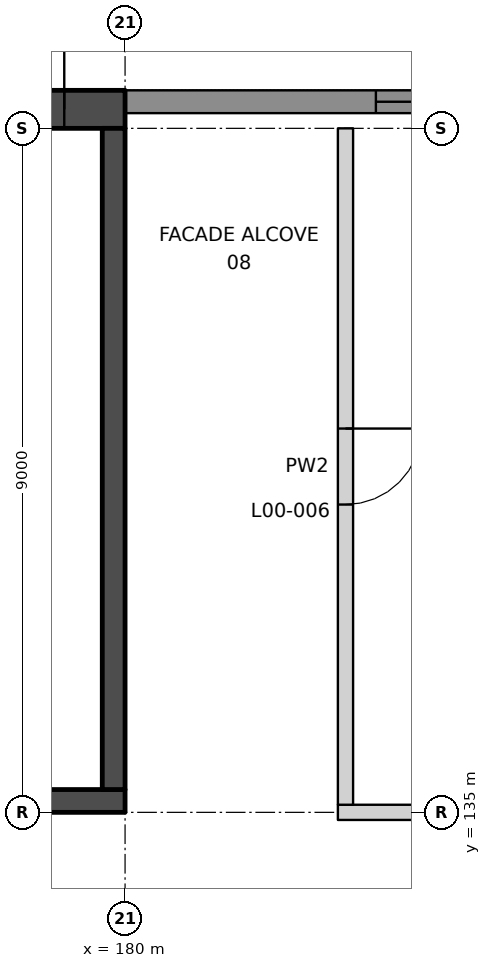
"""IFC4 building model, lengths in metres.
Left out: names, types, materials, properties, quantities, classifications, styles, units other than length and angle.
Written with IfcOpenShell. Run it as: python <this file> out.ifc"""

import sys

from ifc_helpers import new_model, si_unit, direction, frame, frame_2d, origin, place, context, subcontext, project, spatial, rectangle, extrude, element, fill, save


model = new_model("IFC4")
c1 = context("Model", 3, precision=1e-05, world=origin(), true_north=direction((0.0, 1.0)))
c2 = subcontext(c1, "Body", "Model", "MODEL_VIEW")
j1 = project(units=[si_unit("LENGTHUNIT", "METRE"), si_unit("PLANEANGLEUNIT", "RADIAN")], contexts=[c1])
p1 = place(None, origin())
s1 = spatial("IfcSite", under=j1, at=p1, CompositionType="ELEMENT")
p2 = place(p1, origin())
s2 = spatial("IfcBuilding", under=s1, at=p2, CompositionType="ELEMENT")
p3 = place(p2, origin())
s3 = spatial("IfcBuildingStorey", under=s2, at=p3, CompositionType="ELEMENT", Elevation=0.0)
p4 = place(p3, frame((182.8, 135.0, 0.0), z_axis=(0.0, 0.0, 1.0), x_axis=(1.0, 0.0, 0.0)))
e1 = element("IfcWall", 1, at=p4, inside=s3, PredefinedType="PARTITIONING", context=c2, shape_type="SweptSolid", body=[
    extrude(rectangle(XDim=6.2, YDim=0.2, at=frame_2d((3.1, 0.0))), origin(), (0.0, 0.0, 1.0), 5.65),
])
p5 = place(p3, frame((182.9, 135.1, 0.0), z_axis=(0.0, 0.0, 1.0), x_axis=(0.0, 1.0, 0.0)))
e2 = element("IfcWall", 2, at=p5, inside=s3, PredefinedType="PARTITIONING", context=c2, shape_type="SweptSolid", body=[
    extrude(rectangle(XDim=8.9, YDim=0.2, at=frame_2d((4.45, 0.0))), origin(), (0.0, 0.0, 1.0), 7.0),
])
p6 = place(p5, frame((3.95, 0.0, 0.0)))
e3 = element("IfcOpeningElement", 3, at=p6, cuts=e2, PredefinedType="OPENING", context=c2, shape_type="SweptSolid", body=[
    extrude(rectangle(XDim=1.0, YDim=2.1, at=frame_2d((0.5, 1.05))), frame((0.0, 0.11, 0.0), z_axis=(0.0, -1.0, 0.0), x_axis=(1.0, 0.0, 0.0)), (0.0, 0.0, 1.0), 0.22),
])
p7 = place(p3, frame((189.0, 144.35, 0.0), z_axis=(0.0, 0.0, 1.0), x_axis=(-1.0, 0.0, 0.0)))
e4 = element("IfcWall", 4, at=p7, inside=s3, PredefinedType="SOLIDWALL", context=c2, shape_type="SweptSolid", body=[
    extrude(rectangle(XDim=9.0, YDim=0.3, at=frame_2d((4.5, 0.0))), origin(), (0.0, 0.0, 1.0), 7.0),
])
p8 = place(p7, frame((3.3, 0.0, 0.0)))
e5 = element("IfcOpeningElement", 5, at=p8, cuts=e4, PredefinedType="OPENING", context=c2, shape_type="SweptSolid", body=[
    extrude(rectangle(XDim=2.4, YDim=2.4, at=frame_2d((1.2, 1.2))), frame((0.0, 0.16, 0.0), z_axis=(0.0, -1.0, 0.0), x_axis=(1.0, 0.0, 0.0)), (0.0, 0.0, 1.0), 0.32),
])
p9 = place(p3, frame((180.0, 135.15, 0.0), z_axis=(0.0, 0.0, 1.0), x_axis=(-1.0, 0.0, 0.0)))
e6 = element("IfcWall", 6, at=p9, inside=s3, PredefinedType="SHEAR", context=c2, shape_type="SweptSolid", body=[
    extrude(rectangle(XDim=18.0, YDim=0.3, at=frame_2d((9.0, 0.0))), origin(), (0.0, 0.0, 1.0), 7.0),
])
p10 = place(p9, frame((1.5, 0.0, 0.0)))
e7 = element("IfcOpeningElement", 7, at=p10, cuts=e6, PredefinedType="OPENING", context=c2, shape_type="SweptSolid", body=[
    extrude(rectangle(XDim=1.2, YDim=2.1, at=frame_2d((0.6, 1.05))), frame((0.0, 0.16, 0.0), z_axis=(0.0, -1.0, 0.0), x_axis=(1.0, 0.0, 0.0)), (0.0, 0.0, 1.0), 0.32),
])
p11 = place(p3, frame((180.0, 144.25, 0.0), z_axis=(0.0, 0.0, 1.0), x_axis=(-1.0, 0.0, 0.0)))
e8 = element("IfcWall", 8, at=p11, inside=s3, PredefinedType="SHEAR", context=c2, shape_type="SweptSolid", body=[
    extrude(rectangle(XDim=18.0, YDim=0.5, at=frame_2d((9.0, 0.0))), origin(), (0.0, 0.0, 1.0), 7.0),
])
p12 = place(p11, frame((0.8, 0.0, 0.0)))
e9 = element("IfcOpeningElement", 9, at=p12, cuts=e8, PredefinedType="OPENING", context=c2, shape_type="SweptSolid", body=[
    extrude(rectangle(XDim=2.6, YDim=2.4, at=frame_2d((1.3, 1.2))), frame((0.0, 0.26, 0.0), z_axis=(0.0, -1.0, 0.0), x_axis=(1.0, 0.0, 0.0)), (0.0, 0.0, 1.0), 0.52),
])
p13 = place(p3, frame((179.85, 135.3, 0.0), z_axis=(0.0, 0.0, 1.0), x_axis=(0.0, 1.0, 0.0)))
e10 = element("IfcWall", 10, at=p13, inside=s3, PredefinedType="SHEAR", context=c2, shape_type="SweptSolid", body=[
    extrude(rectangle(XDim=8.7, YDim=0.3, at=frame_2d((4.35, 0.0))), origin(), (0.0, 0.0, 1.0), 7.0),
])
p14 = place(p6, frame((1.0, 0.0, 0.0), z_axis=(0.0, 0.0, 1.0), x_axis=(-1.0, 0.0, 0.0)))
e11 = element("IfcDoor", 11, at=p14, inside=s3, OperationType="SINGLE_SWING_LEFT", PredefinedType="DOOR", context=c2, shape_type="SweptSolid", body=[
    extrude(rectangle(XDim=1.0, YDim=2.1, at=frame_2d((0.5, 1.05))), frame((0.0, 0.025, 0.0), z_axis=(0.0, -1.0, 0.0), x_axis=(1.0, 0.0, 0.0)), (0.0, 0.0, 1.0), 0.05),
])
fill(e3, e11)
p15 = place(p8, frame((2.4, 0.0, 0.0), z_axis=(0.0, 0.0, 1.0), x_axis=(-1.0, 0.0, 0.0)))
e12 = element("IfcDoor", 12, at=p15, inside=s3, OperationType="DOUBLE_DOOR_SINGLE_SWING", PredefinedType="DOOR", context=c2, shape_type="SweptSolid", body=[
    extrude(rectangle(XDim=2.4, YDim=2.4, at=frame_2d((1.2, 1.2))), frame((0.0, 0.025, 0.0), z_axis=(0.0, -1.0, 0.0), x_axis=(1.0, 0.0, 0.0)), (0.0, 0.0, 1.0), 0.05),
])
fill(e5, e12)
p16 = place(p12, frame((2.6, 0.0, 0.0), z_axis=(0.0, 0.0, 1.0), x_axis=(-1.0, 0.0, 0.0)))
e13 = element("IfcDoor", 13, at=p16, inside=s3, OperationType="DOUBLE_DOOR_SINGLE_SWING", PredefinedType="DOOR", context=c2, shape_type="SweptSolid", body=[
    extrude(rectangle(XDim=2.6, YDim=2.4, at=frame_2d((1.3, 1.2))), frame((0.0, 0.025, 0.0), z_axis=(0.0, -1.0, 0.0), x_axis=(1.0, 0.0, 0.0)), (0.0, 0.0, 1.0), 0.05),
])
fill(e9, e13)
save(model, sys.argv[1])
